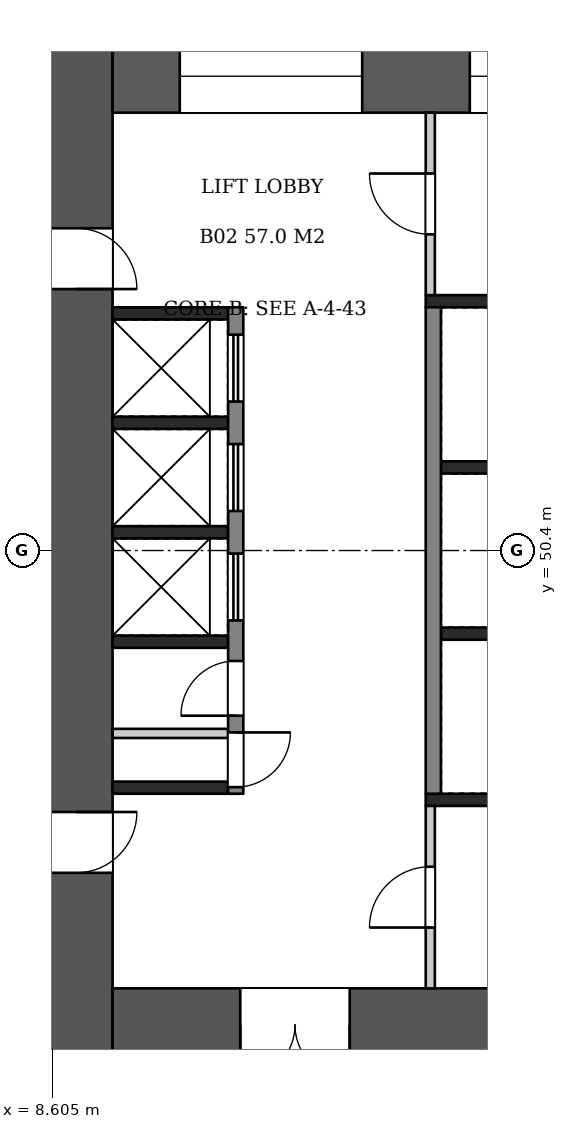
"""IFC4 building model, lengths in metres.
Left out: names, types, materials, properties, quantities, classifications, styles, units other than length and angle.
Written with IfcOpenShell. Run it as: python <this file> out.ifc"""

import sys

from ifc_helpers import new_model, si_unit, direction, frame, frame_2d, origin, place, context, subcontext, project, spatial, rectangle, extrude, element, fill, save


model = new_model("IFC4")
c1 = context("Model", 3, precision=1e-05, world=origin(), true_north=direction((0.0, 1.0)))
c2 = subcontext(c1, "Body", "Model", "MODEL_VIEW")
j1 = project(units=[si_unit("LENGTHUNIT", "METRE"), si_unit("PLANEANGLEUNIT", "RADIAN")], contexts=[c1])
p1 = place(None, origin())
s1 = spatial("IfcSite", under=j1, at=p1, CompositionType="ELEMENT")
p2 = place(p1, origin())
s2 = spatial("IfcBuilding", under=s1, at=p2, CompositionType="ELEMENT")
p3 = place(p2, frame((0.0, 0.0, 14.4)))
s3 = spatial("IfcBuildingStorey", under=s2, at=p3, CompositionType="ELEMENT", Elevation=14.4)
p4 = place(p3, frame((9.0, 58.8, 0.0), z_axis=(0.0, 0.0, 1.0), x_axis=(0.0, -1.0, 0.0)))
e1 = element("IfcWall", 1, at=p4, inside=s3, PredefinedType="SHEAR", context=c2, shape_type="SweptSolid", body=[
    extrude(rectangle(XDim=16.8, YDim=1.2, at=frame_2d((8.4, 0.0))), origin(), (0.0, 0.0, 1.0), 5.1),
])
p5 = place(p4, frame((3.1, 0.0, 0.0)))
e2 = element("IfcOpeningElement", 2, at=p5, cuts=e1, PredefinedType="OPENING", context=c2, shape_type="SweptSolid", body=[
    extrude(rectangle(XDim=1.0, YDim=2.1, at=frame_2d((0.5, 1.05))), frame((0.0, 0.61, 0.0), z_axis=(0.0, -1.0, 0.0), x_axis=(1.0, 0.0, 0.0)), (0.0, 0.0, 1.0), 1.22),
])
p6 = place(p4, frame((12.7, 0.0, 0.0)))
e3 = element("IfcOpeningElement", 3, at=p6, cuts=e1, PredefinedType="OPENING", context=c2, shape_type="SweptSolid", body=[
    extrude(rectangle(XDim=1.0, YDim=2.1, at=frame_2d((0.5, 1.05))), frame((0.0, 0.61, 0.0), z_axis=(0.0, -1.0, 0.0), x_axis=(1.0, 0.0, 0.0)), (0.0, 0.0, 1.0), 1.22),
])
p7 = place(p3, frame((9.6, 58.2, 0.0), z_axis=(0.0, 0.0, 1.0), x_axis=(1.0, 0.0, 0.0)))
e4 = element("IfcWall", 4, at=p7, inside=s3, PredefinedType="SHEAR", context=c2, shape_type="SweptSolid", body=[
    extrude(rectangle(XDim=14.4, YDim=1.2, at=frame_2d((7.2, 0.0))), origin(), (0.0, 0.0, 1.0), 5.1),
])
p8 = place(p7, frame((1.105, 0.0, 0.6)))
e5 = element("IfcOpeningElement", 5, at=p8, cuts=e4, PredefinedType="OPENING", context=c2, shape_type="SweptSolid", body=[
    extrude(rectangle(XDim=3.0, YDim=2.1, at=frame_2d((1.5, 1.05))), frame((0.0, 0.61, 0.0), z_axis=(0.0, -1.0, 0.0), x_axis=(1.0, 0.0, 0.0)), (0.0, 0.0, 1.0), 1.22),
])
p9 = place(p7, frame((5.875, 0.0, 0.6)))
e6 = element("IfcOpeningElement", 6, at=p9, cuts=e4, PredefinedType="OPENING", context=c2, shape_type="SweptSolid", body=[
    extrude(rectangle(XDim=2.4, YDim=2.1, at=frame_2d((1.2, 1.05))), frame((0.0, 0.61, 0.0), z_axis=(0.0, -1.0, 0.0), x_axis=(1.0, 0.0, 0.0)), (0.0, 0.0, 1.0), 1.22),
])
p10 = place(p7, frame((9.993, 0.0, 0.5)))
e7 = element("IfcOpeningElement", 7, at=p10, cuts=e4, PredefinedType="OPENING", context=c2, shape_type="SweptSolid", body=[
    extrude(rectangle(XDim=1.2, YDim=2.4, at=frame_2d((0.6, 1.2))), frame((0.0, 0.61, 0.0), z_axis=(0.0, -1.0, 0.0), x_axis=(1.0, 0.0, 0.0)), (0.0, 0.0, 1.0), 1.22),
])
p11 = place(p7, frame((12.197, 0.0, 0.5)))
e8 = element("IfcOpeningElement", 8, at=p11, cuts=e4, PredefinedType="OPENING", context=c2, shape_type="SweptSolid", body=[
    extrude(rectangle(XDim=1.2, YDim=2.4, at=frame_2d((0.6, 1.2))), frame((0.0, 0.61, 0.0), z_axis=(0.0, -1.0, 0.0), x_axis=(1.0, 0.0, 0.0)), (0.0, 0.0, 1.0), 1.22),
])
p12 = place(p3, frame((9.6, 42.6, 0.0), z_axis=(0.0, 0.0, 1.0), x_axis=(1.0, 0.0, 0.0)))
e9 = element("IfcWall", 9, at=p12, inside=s3, PredefinedType="SHEAR", context=c2, shape_type="SweptSolid", body=[
    extrude(rectangle(XDim=14.4, YDim=1.2, at=frame_2d((7.2, 0.0))), origin(), (0.0, 0.0, 1.0), 5.1),
])
p13 = place(p12, frame((2.1, 0.0, 0.0)))
e10 = element("IfcOpeningElement", 10, at=p13, cuts=e9, PredefinedType="OPENING", context=c2, shape_type="SweptSolid", body=[
    extrude(rectangle(XDim=1.8, YDim=2.1, at=frame_2d((0.9, 1.05))), frame((0.0, 0.61, 0.0), z_axis=(0.0, -1.0, 0.0), x_axis=(1.0, 0.0, 0.0)), (0.0, 0.0, 1.0), 1.22),
])
for number, where, z_axis, x_axis in (
    (11, (9.6, 54.3, 0.0), (0.0, 0.0, 1.0), (1.0, 0.0, 0.0)),
    (12, (9.6, 52.5, 0.0), (0.0, 0.0, 1.0), (1.0, 0.0, 0.0)),
    (13, (9.6, 50.7, 0.0), (0.0, 0.0, 1.0), (1.0, 0.0, 0.0)),
    (14, (9.6, 48.9, 0.0), (0.0, 0.0, 1.0), (1.0, 0.0, 0.0)),
    (15, (9.6, 46.5, 0.0), (0.0, 0.0, 1.0), (1.0, 0.0, 0.0)),
):
    element("IfcWall", number, at=place(p3, frame(where, z_axis=z_axis, x_axis=x_axis)), inside=s3, PredefinedType="SHEAR", context=c2, shape_type="SweptSolid", body=[
        extrude(rectangle(XDim=1.9, YDim=0.2, at=frame_2d((0.95, 0.0))), origin(), (0.0, 0.0, 1.0), 5.1),
    ])
p14 = place(p3, frame((9.6, 47.393, 0.0), z_axis=(0.0, 0.0, 1.0), x_axis=(1.0, 0.0, 0.0)))
e16 = element("IfcWall", 16, at=p14, inside=s3, PredefinedType="PARTITIONING", context=c2, shape_type="SweptSolid", body=[
    extrude(rectangle(XDim=1.9, YDim=0.15, at=frame_2d((0.95, 0.0))), origin(), (0.0, 0.0, 1.0), 5.1),
])
p15 = place(p3, frame((11.625, 54.4, 0.0), z_axis=(0.0, 0.0, 1.0), x_axis=(0.0, -1.0, 0.0)))
e17 = element("IfcWall", 17, at=p15, inside=s3, PredefinedType="SHEAR", context=c2, shape_type="SweptSolid", body=[
    extrude(rectangle(XDim=8.0, YDim=0.25, at=frame_2d((4.0, 0.0))), origin(), (0.0, 0.0, 1.0), 5.1),
])
p16 = place(p15, frame((0.45, 0.0, 0.0)))
e18 = element("IfcOpeningElement", 18, at=p16, cuts=e17, PredefinedType="OPENING", context=c2, shape_type="SweptSolid", body=[
    extrude(rectangle(XDim=1.1, YDim=2.1, at=frame_2d((0.55, 1.05))), frame((0.0, 0.135, 0.0), z_axis=(0.0, -1.0, 0.0), x_axis=(1.0, 0.0, 0.0)), (0.0, 0.0, 1.0), 0.27),
])
p17 = place(p15, frame((2.25, 0.0, 0.0)))
e19 = element("IfcOpeningElement", 19, at=p17, cuts=e17, PredefinedType="OPENING", context=c2, shape_type="SweptSolid", body=[
    extrude(rectangle(XDim=1.1, YDim=2.1, at=frame_2d((0.55, 1.05))), frame((0.0, 0.135, 0.0), z_axis=(0.0, -1.0, 0.0), x_axis=(1.0, 0.0, 0.0)), (0.0, 0.0, 1.0), 0.27),
])
p18 = place(p15, frame((4.05, 0.0, 0.0)))
e20 = element("IfcOpeningElement", 20, at=p18, cuts=e17, PredefinedType="OPENING", context=c2, shape_type="SweptSolid", body=[
    extrude(rectangle(XDim=1.1, YDim=2.1, at=frame_2d((0.55, 1.05))), frame((0.0, 0.135, 0.0), z_axis=(0.0, -1.0, 0.0), x_axis=(1.0, 0.0, 0.0)), (0.0, 0.0, 1.0), 0.27),
])
p19 = place(p15, frame((5.816, 0.0, 0.0)))
e21 = element("IfcOpeningElement", 21, at=p19, cuts=e17, PredefinedType="OPENING", context=c2, shape_type="SweptSolid", body=[
    extrude(rectangle(XDim=0.9, YDim=2.1, at=frame_2d((0.45, 1.05))), frame((0.0, 0.135, 0.0), z_axis=(0.0, -1.0, 0.0), x_axis=(1.0, 0.0, 0.0)), (0.0, 0.0, 1.0), 0.27),
])
p20 = place(p15, frame((6.991, 0.0, 0.0)))
e22 = element("IfcOpeningElement", 22, at=p20, cuts=e17, PredefinedType="OPENING", context=c2, shape_type="SweptSolid", body=[
    extrude(rectangle(XDim=0.9, YDim=2.1, at=frame_2d((0.45, 1.05))), frame((0.0, 0.135, 0.0), z_axis=(0.0, -1.0, 0.0), x_axis=(1.0, 0.0, 0.0)), (0.0, 0.0, 1.0), 0.27),
])
for number, where, z_axis, x_axis in (
    (23, (15.0, 51.767, 0.0), (0.0, 0.0, 1.0), (1.0, 0.0, 0.0)),
    (24, (15.0, 49.033, 0.0), (0.0, 0.0, 1.0), (1.0, 0.0, 0.0)),
):
    element("IfcWall", number, at=place(p3, frame(where, z_axis=z_axis, x_axis=x_axis)), inside=s3, PredefinedType="SHEAR", context=c2, shape_type="SweptSolid", body=[
        extrude(rectangle(XDim=1.9, YDim=0.2, at=frame_2d((0.95, 0.0))), origin(), (0.0, 0.0, 1.0), 5.1),
    ])
p21 = place(p3, frame((14.875, 54.4, 0.0), z_axis=(0.0, 0.0, 1.0), x_axis=(0.0, -1.0, 0.0)))
e25 = element("IfcWall", 25, at=p21, inside=s3, PredefinedType="SHEAR", context=c2, shape_type="SweptSolid", body=[
    extrude(rectangle(XDim=8.0, YDim=0.25, at=frame_2d((4.0, 0.0))), origin(), (0.0, 0.0, 1.0), 5.1),
])
p22 = place(p3, frame((14.75, 54.5, 0.0), z_axis=(0.0, 0.0, 1.0), x_axis=(1.0, 0.0, 0.0)))
e26 = element("IfcWall", 26, at=p22, inside=s3, PredefinedType="SHEAR", context=c2, shape_type="SweptSolid", body=[
    extrude(rectangle(XDim=2.4, YDim=0.2, at=frame_2d((1.2, 0.0))), origin(), (0.0, 0.0, 1.0), 5.1),
])
p23 = place(p3, frame((14.825, 57.6, 0.0), z_axis=(0.0, 0.0, 1.0), x_axis=(0.0, -1.0, 0.0)))
e27 = element("IfcWall", 27, at=p23, inside=s3, PredefinedType="PARTITIONING", context=c2, shape_type="SweptSolid", body=[
    extrude(rectangle(XDim=3.0, YDim=0.15, at=frame_2d((1.5, 0.0))), origin(), (0.0, 0.0, 1.0), 5.1),
])
p24 = place(p23, frame((1.0, 0.0, 0.0)))
e28 = element("IfcOpeningElement", 28, at=p24, cuts=e27, PredefinedType="OPENING", context=c2, shape_type="SweptSolid", body=[
    extrude(rectangle(XDim=1.0, YDim=2.1, at=frame_2d((0.5, 1.05))), frame((0.0, 0.085, 0.0), z_axis=(0.0, -1.0, 0.0), x_axis=(1.0, 0.0, 0.0)), (0.0, 0.0, 1.0), 0.17),
])
p25 = place(p3, frame((14.75, 46.3, 0.0), z_axis=(0.0, 0.0, 1.0), x_axis=(1.0, 0.0, 0.0)))
e29 = element("IfcWall", 29, at=p25, inside=s3, PredefinedType="SHEAR", context=c2, shape_type="SweptSolid", body=[
    extrude(rectangle(XDim=2.4, YDim=0.2, at=frame_2d((1.2, 0.0))), origin(), (0.0, 0.0, 1.0), 5.1),
])
p26 = place(p3, frame((14.825, 46.2, 0.0), z_axis=(0.0, 0.0, 1.0), x_axis=(0.0, -1.0, 0.0)))
e30 = element("IfcWall", 30, at=p26, inside=s3, PredefinedType="PARTITIONING", context=c2, shape_type="SweptSolid", body=[
    extrude(rectangle(XDim=3.0, YDim=0.15, at=frame_2d((1.5, 0.0))), origin(), (0.0, 0.0, 1.0), 5.1),
])
p27 = place(p26, frame((1.0, 0.0, 0.0)))
e31 = element("IfcOpeningElement", 31, at=p27, cuts=e30, PredefinedType="OPENING", context=c2, shape_type="SweptSolid", body=[
    extrude(rectangle(XDim=1.0, YDim=2.1, at=frame_2d((0.5, 1.05))), frame((0.0, 0.085, 0.0), z_axis=(0.0, -1.0, 0.0), x_axis=(1.0, 0.0, 0.0)), (0.0, 0.0, 1.0), 0.17),
])
p28 = place(p5, origin())
e32 = element("IfcDoor", 32, at=p28, inside=s3, OperationType="SINGLE_SWING_RIGHT", PredefinedType="DOOR", context=c2, shape_type="SweptSolid", body=[
    extrude(rectangle(XDim=1.0, YDim=2.1, at=frame_2d((0.5, 1.05))), frame((0.0, 0.025, 0.0), z_axis=(0.0, -1.0, 0.0), x_axis=(1.0, 0.0, 0.0)), (0.0, 0.0, 1.0), 0.05),
])
fill(e2, e32)
p29 = place(p6, origin())
e33 = element("IfcDoor", 33, at=p29, inside=s3, OperationType="SINGLE_SWING_LEFT", PredefinedType="DOOR", context=c2, shape_type="SweptSolid", body=[
    extrude(rectangle(XDim=1.0, YDim=2.1, at=frame_2d((0.5, 1.05))), frame((0.0, 0.025, 0.0), z_axis=(0.0, -1.0, 0.0), x_axis=(1.0, 0.0, 0.0)), (0.0, 0.0, 1.0), 0.05),
])
fill(e3, e33)
p30 = place(p13, frame((1.8, 0.0, 0.0), z_axis=(0.0, 0.0, 1.0), x_axis=(-1.0, 0.0, 0.0)))
e34 = element("IfcDoor", 34, at=p30, inside=s3, OperationType="DOUBLE_DOOR_SINGLE_SWING", PredefinedType="DOOR", context=c2, shape_type="SweptSolid", body=[
    extrude(rectangle(XDim=1.8, YDim=2.1, at=frame_2d((0.9, 1.05))), frame((0.0, 0.025, 0.0), z_axis=(0.0, -1.0, 0.0), x_axis=(1.0, 0.0, 0.0)), (0.0, 0.0, 1.0), 0.05),
])
fill(e10, e34)
p31 = place(p16, origin())
e35 = element("IfcDoor", 35, at=p31, inside=s3, OperationType="DOUBLE_DOOR_SLIDING", PredefinedType="DOOR", context=c2, shape_type="SweptSolid", body=[
    extrude(rectangle(XDim=1.1, YDim=2.1, at=frame_2d((0.55, 1.05))), frame((0.0, 0.025, 0.0), z_axis=(0.0, -1.0, 0.0), x_axis=(1.0, 0.0, 0.0)), (0.0, 0.0, 1.0), 0.05),
])
fill(e18, e35)
p32 = place(p17, origin())
e36 = element("IfcDoor", 36, at=p32, inside=s3, OperationType="DOUBLE_DOOR_SLIDING", PredefinedType="DOOR", context=c2, shape_type="SweptSolid", body=[
    extrude(rectangle(XDim=1.1, YDim=2.1, at=frame_2d((0.55, 1.05))), frame((0.0, 0.025, 0.0), z_axis=(0.0, -1.0, 0.0), x_axis=(1.0, 0.0, 0.0)), (0.0, 0.0, 1.0), 0.05),
])
fill(e19, e36)
p33 = place(p18, origin())
e37 = element("IfcDoor", 37, at=p33, inside=s3, OperationType="DOUBLE_DOOR_SLIDING", PredefinedType="DOOR", context=c2, shape_type="SweptSolid", body=[
    extrude(rectangle(XDim=1.1, YDim=2.1, at=frame_2d((0.55, 1.05))), frame((0.0, 0.025, 0.0), z_axis=(0.0, -1.0, 0.0), x_axis=(1.0, 0.0, 0.0)), (0.0, 0.0, 1.0), 0.05),
])
fill(e20, e37)
p34 = place(p19, frame((0.9, 0.0, 0.0), z_axis=(0.0, 0.0, 1.0), x_axis=(-1.0, 0.0, 0.0)))
e38 = element("IfcDoor", 38, at=p34, inside=s3, OperationType="SINGLE_SWING_LEFT", PredefinedType="DOOR", context=c2, shape_type="SweptSolid", body=[
    extrude(rectangle(XDim=0.9, YDim=2.1, at=frame_2d((0.45, 1.05))), frame((0.0, 0.025, 0.0), z_axis=(0.0, -1.0, 0.0), x_axis=(1.0, 0.0, 0.0)), (0.0, 0.0, 1.0), 0.05),
])
fill(e21, e38)
p35 = place(p20, origin())
e39 = element("IfcDoor", 39, at=p35, inside=s3, OperationType="SINGLE_SWING_LEFT", PredefinedType="DOOR", context=c2, shape_type="SweptSolid", body=[
    extrude(rectangle(XDim=0.9, YDim=2.1, at=frame_2d((0.45, 1.05))), frame((0.0, 0.025, 0.0), z_axis=(0.0, -1.0, 0.0), x_axis=(1.0, 0.0, 0.0)), (0.0, 0.0, 1.0), 0.05),
])
fill(e22, e39)
p36 = place(p24, frame((1.0, 0.0, 0.0), z_axis=(0.0, 0.0, 1.0), x_axis=(-1.0, 0.0, 0.0)))
e40 = element("IfcDoor", 40, at=p36, inside=s3, OperationType="SINGLE_SWING_RIGHT", PredefinedType="DOOR", context=c2, shape_type="SweptSolid", body=[
    extrude(rectangle(XDim=1.0, YDim=2.1, at=frame_2d((0.5, 1.05))), frame((0.0, 0.025, 0.0), z_axis=(0.0, -1.0, 0.0), x_axis=(1.0, 0.0, 0.0)), (0.0, 0.0, 1.0), 0.05),
])
fill(e28, e40)
p37 = place(p27, frame((1.0, 0.0, 0.0), z_axis=(0.0, 0.0, 1.0), x_axis=(-1.0, 0.0, 0.0)))
e41 = element("IfcDoor", 41, at=p37, inside=s3, OperationType="SINGLE_SWING_LEFT", PredefinedType="DOOR", context=c2, shape_type="SweptSolid", body=[
    extrude(rectangle(XDim=1.0, YDim=2.1, at=frame_2d((0.5, 1.05))), frame((0.0, 0.025, 0.0), z_axis=(0.0, -1.0, 0.0), x_axis=(1.0, 0.0, 0.0)), (0.0, 0.0, 1.0), 0.05),
])
fill(e31, e41)
p38 = place(p8, origin())
e42 = element("IfcWindow", 42, at=p38, inside=s3, PartitioningType="SINGLE_PANEL", PredefinedType="WINDOW", context=c2, shape_type="SweptSolid", body=[
    extrude(rectangle(XDim=3.0, YDim=2.1, at=frame_2d((1.5, 1.05))), frame((0.0, 0.03, 0.0), z_axis=(0.0, -1.0, 0.0), x_axis=(1.0, 0.0, 0.0)), (0.0, 0.0, 1.0), 0.06),
])
fill(e5, e42)
p39 = place(p9, origin())
e43 = element("IfcWindow", 43, at=p39, inside=s3, PartitioningType="SINGLE_PANEL", PredefinedType="WINDOW", context=c2, shape_type="SweptSolid", body=[
    extrude(rectangle(XDim=2.4, YDim=2.1, at=frame_2d((1.2, 1.05))), frame((0.0, 0.03, 0.0), z_axis=(0.0, -1.0, 0.0), x_axis=(1.0, 0.0, 0.0)), (0.0, 0.0, 1.0), 0.06),
])
fill(e6, e43)
save(model, sys.argv[1])
